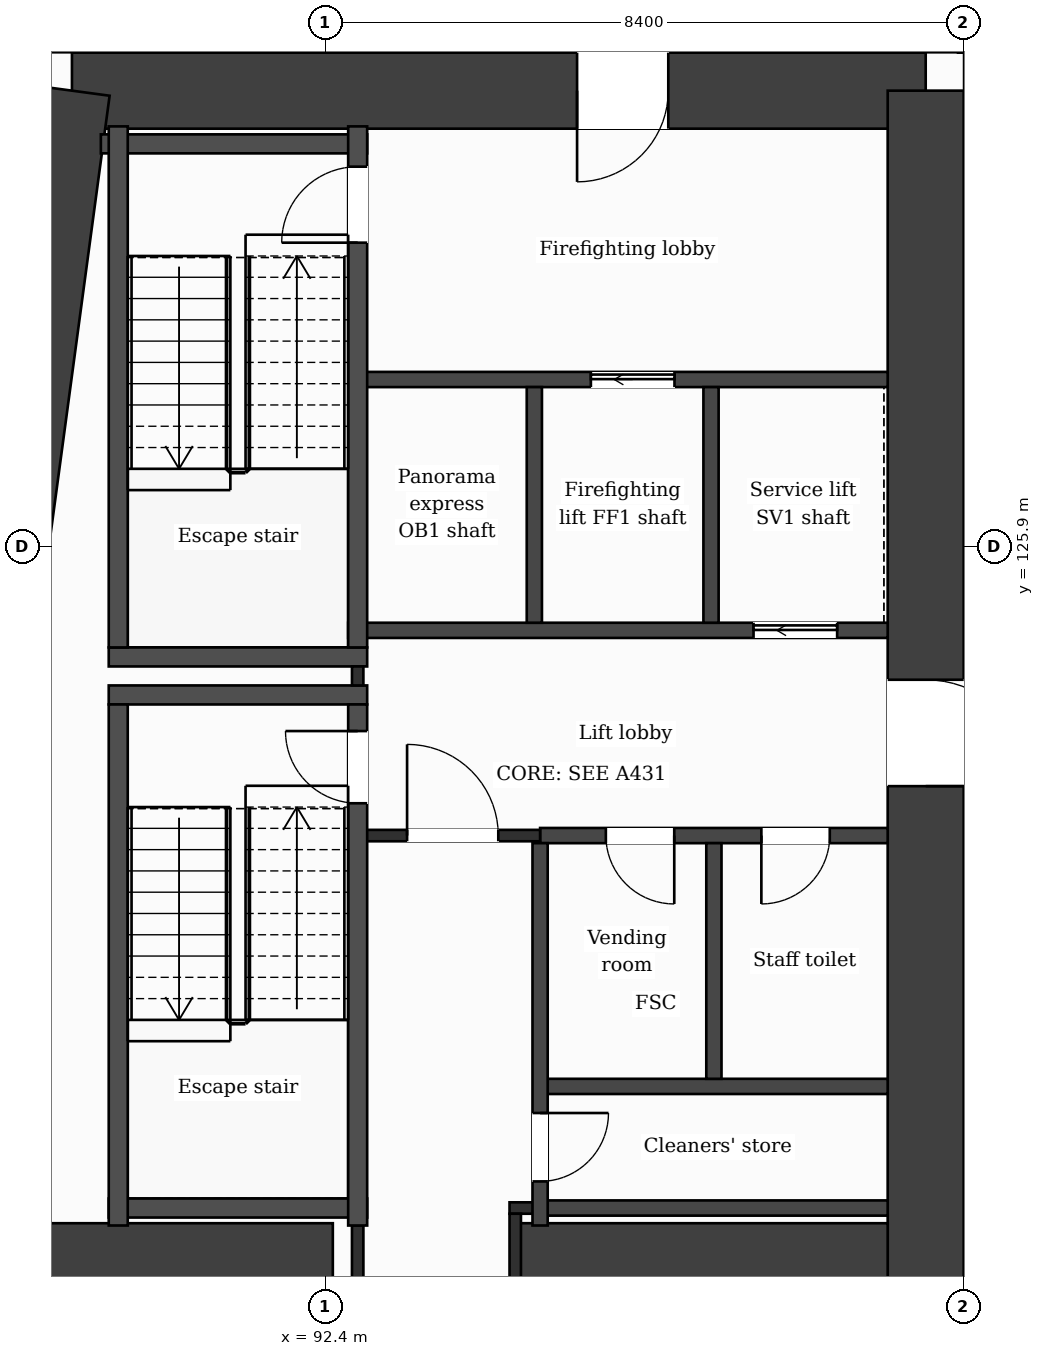
"""IFC4 building model, lengths in metres.
Left out: names, types, materials, properties, quantities, classifications, styles, units other than length and angle.
Written with IfcOpenShell. Run it as: python <this file> out.ifc"""

import sys

from ifc_helpers import new_model, si_unit, direction, frame, frame_2d, origin, place, context, subcontext, project, spatial, rectangle, extrude, element, fill, save


model = new_model("IFC4")
c1 = context("Model", 3, precision=1e-05, world=origin(), true_north=direction((0.0, 1.0)))
c2 = subcontext(c1, "Body", "Model", "MODEL_VIEW")
j1 = project(units=[si_unit("LENGTHUNIT", "METRE"), si_unit("PLANEANGLEUNIT", "RADIAN")], contexts=[c1])
p1 = place(None, origin())
s1 = spatial("IfcSite", under=j1, at=p1, CompositionType="ELEMENT")
p2 = place(p1, origin())
s2 = spatial("IfcBuilding", under=s1, at=p2, CompositionType="ELEMENT")
p3 = place(p2, frame((0.0, 0.0, 128.0)))
s3 = spatial("IfcBuildingStorey", under=s2, at=p3, CompositionType="ELEMENT", Elevation=128.0)
p4 = place(p3, frame((89.068, 131.9, 0.0), z_axis=(0.0, 0.0, 1.0), x_axis=(1.0, 0.0, 0.0)))
e1 = element("IfcWall", 1, at=p4, inside=s3, PredefinedType="SHEAR", context=c2, shape_type="SweptSolid", body=[
    extrude(rectangle(XDim=11.232, YDim=1.0, at=frame_2d((5.616, 0.0))), origin(), (0.0, 0.0, 1.0), 3.7),
])
p5 = place(p4, frame((6.646, 0.0, 0.0)))
e2 = element("IfcOpeningElement", 2, at=p5, cuts=e1, PredefinedType="OPENING", context=c2, shape_type="SweptSolid", body=[
    extrude(rectangle(XDim=1.2, YDim=2.1, at=frame_2d((0.6, 1.05))), frame((0.0, 0.51, 0.0), z_axis=(0.0, -1.0, 0.0), x_axis=(1.0, 0.0, 0.0)), (0.0, 0.0, 1.0), 1.02),
])
p6 = place(p3, frame((100.3, 131.9, 0.0), z_axis=(0.0, 0.0, 1.0), x_axis=(0.0, -1.0, 0.0)))
e3 = element("IfcWall", 3, at=p6, inside=s3, PredefinedType="SHEAR", context=c2, shape_type="SweptSolid", body=[
    extrude(rectangle(XDim=21.0, YDim=1.0, at=frame_2d((10.5, 0.0))), origin(), (0.0, 0.0, 1.0), 3.7),
])
p7 = place(p6, frame((7.75, 0.0, 0.0)))
e4 = element("IfcOpeningElement", 4, at=p7, cuts=e3, PredefinedType="OPENING", context=c2, shape_type="SweptSolid", body=[
    extrude(rectangle(XDim=1.4, YDim=2.1, at=frame_2d((0.7, 1.05))), frame((0.0, 0.51, 0.0), z_axis=(0.0, -1.0, 0.0), x_axis=(1.0, 0.0, 0.0)), (0.0, 0.0, 1.0), 1.02),
])
p8 = place(p3, frame((86.241, 110.9, 0.0), z_axis=(0.0, 0.0, 1.0), x_axis=(0.133411141623, 0.991060778808, 0.0)))
e5 = element("IfcWall", 5, at=p8, inside=s3, PredefinedType="SHEAR", context=c2, shape_type="SweptSolid", body=[
    extrude(rectangle(XDim=21.189, YDim=1.0, at=frame_2d((10.595, 0.0))), origin(), (0.0, 0.0, 1.0), 3.7),
])
p9 = place(p3, frame((87.423, 116.5, 0.0), z_axis=(0.0, 0.0, 1.0), x_axis=(1.0, 0.0, 0.0)))
e6 = element("IfcWall", 6, at=p9, inside=s3, PredefinedType="SHEAR", context=c2, shape_type="SweptSolid", body=[
    extrude(rectangle(XDim=5.077, YDim=1.0, at=frame_2d((2.539, 0.0))), origin(), (0.0, 0.0, 1.0), 3.7),
])
p10 = place(p3, frame((94.9, 116.5, 0.0), z_axis=(0.0, 0.0, 1.0), x_axis=(1.0, 0.0, 0.0)))
e7 = element("IfcWall", 7, at=p10, inside=s3, PredefinedType="SHEAR", context=c2, shape_type="SweptSolid", body=[
    extrude(rectangle(XDim=4.9, YDim=1.0, at=frame_2d((2.45, 0.0))), origin(), (0.0, 0.0, 1.0), 3.7),
])
p11 = place(p3, frame((91.177, 138.95, 0.0), z_axis=(0.0, 0.0, 1.0), x_axis=(-0.133426664613, -0.991058689065, 0.0)))
e8 = element("IfcWall", 8, at=p11, inside=s3, PredefinedType="SOLIDWALL", context=c2, shape_type="SweptSolid", body=[
    extrude(rectangle(XDim=6.609, YDim=0.3, at=frame_2d((3.305, 0.0))), origin(), (0.0, 0.0, 1.0), 3.38),
])
p12 = place(p11, frame((1.039, 0.0, 0.9)))
e9 = element("IfcOpeningElement", 9, at=p12, cuts=e8, PredefinedType="OPENING", context=c2, shape_type="SweptSolid", body=[
    extrude(rectangle(XDim=1.2, YDim=2.1, at=frame_2d((0.6, 1.05))), frame((0.0, 0.16, 0.0), z_axis=(0.0, -1.0, 0.0), x_axis=(1.0, 0.0, 0.0)), (0.0, 0.0, 1.0), 0.32),
])
p13 = place(p11, frame((4.294, 0.0, 0.0)))
e10 = element("IfcOpeningElement", 10, at=p13, cuts=e8, PredefinedType="OPENING", context=c2, shape_type="SweptSolid", body=[
    extrude(rectangle(XDim=1.2, YDim=2.4, at=frame_2d((0.6, 1.2))), frame((0.0, 0.16, 0.0), z_axis=(0.0, -1.0, 0.0), x_axis=(1.0, 0.0, 0.0)), (0.0, 0.0, 1.0), 0.32),
])
p14 = place(p3, frame((95.227, 117.2, 0.0), z_axis=(0.0, 0.0, 1.0), x_axis=(1.0, 0.0, 0.0)))
e11 = element("IfcWall", 11, at=p14, inside=s3, PredefinedType="PARTITIONING", context=c2, shape_type="SweptSolid", body=[
    extrude(rectangle(XDim=4.573, YDim=0.2, at=frame_2d((2.287, 0.0))), origin(), (0.0, 0.0, 1.0), 3.38),
])
p15 = place(p3, frame((94.825, 117.2, 0.0), z_axis=(0.0, 0.0, 1.0), x_axis=(1.0, 0.0, 0.0)))
e12 = element("IfcWall", 12, at=p15, inside=s3, PredefinedType="PARTITIONING", context=c2, shape_type="SweptSolid", body=[
    extrude(rectangle(XDim=0.402, YDim=0.15, at=frame_2d((0.201, 0.0))), origin(), (0.0, 0.0, 1.0), 3.38),
])
p16 = place(p3, frame((89.552, 117.2, 0.0), z_axis=(0.0, 0.0, 1.0), x_axis=(1.0, 0.0, 0.0)))
e13 = element("IfcWall", 13, at=p16, inside=s3, PredefinedType="PARTITIONING", context=c2, shape_type="SweptSolid", body=[
    extrude(rectangle(XDim=3.4, YDim=0.25, at=frame_2d((1.7, 0.0))), origin(), (0.0, 0.0, 1.0), 3.38),
])
p17 = place(p3, frame((95.227, 118.8, 0.0), z_axis=(0.0, 0.0, 1.0), x_axis=(1.0, 0.0, 0.0)))
e14 = element("IfcWall", 14, at=p17, inside=s3, PredefinedType="PARTITIONING", context=c2, shape_type="SweptSolid", body=[
    extrude(rectangle(XDim=4.573, YDim=0.2, at=frame_2d((2.287, 0.0))), origin(), (0.0, 0.0, 1.0), 3.38),
])
p18 = place(p3, frame((95.227, 122.1, 0.0), z_axis=(0.0, 0.0, 1.0), x_axis=(1.0, 0.0, 0.0)))
e15 = element("IfcWall", 15, at=p18, inside=s3, PredefinedType="PARTITIONING", context=c2, shape_type="SweptSolid", body=[
    extrude(rectangle(XDim=4.573, YDim=0.2, at=frame_2d((2.287, 0.0))), origin(), (0.0, 0.0, 1.0), 3.38),
])
p19 = place(p18, frame((0.865, 0.0, 0.0)))
e16 = element("IfcOpeningElement", 16, at=p19, cuts=e15, PredefinedType="OPENING", context=c2, shape_type="SweptSolid", body=[
    extrude(rectangle(XDim=0.9, YDim=2.1, at=frame_2d((0.45, 1.05))), frame((0.0, 0.11, 0.0), z_axis=(0.0, -1.0, 0.0), x_axis=(1.0, 0.0, 0.0)), (0.0, 0.0, 1.0), 0.22),
])
p20 = place(p18, frame((2.911, 0.0, 0.0)))
e17 = element("IfcOpeningElement", 17, at=p20, cuts=e15, PredefinedType="OPENING", context=c2, shape_type="SweptSolid", body=[
    extrude(rectangle(XDim=0.9, YDim=2.1, at=frame_2d((0.45, 1.05))), frame((0.0, 0.11, 0.0), z_axis=(0.0, -1.0, 0.0), x_axis=(1.0, 0.0, 0.0)), (0.0, 0.0, 1.0), 0.22),
])
p21 = place(p3, frame((92.827, 122.1, 0.0), z_axis=(0.0, 0.0, 1.0), x_axis=(1.0, 0.0, 0.0)))
e18 = element("IfcWall", 18, at=p21, inside=s3, PredefinedType="PARTITIONING", context=c2, shape_type="SweptSolid", body=[
    extrude(rectangle(XDim=2.4, YDim=0.15, at=frame_2d((1.2, 0.0))), origin(), (0.0, 0.0, 1.0), 3.38),
])
p22 = place(p21, frame((0.65, 0.0, 0.0)))
e19 = element("IfcOpeningElement", 19, at=p22, cuts=e18, PredefinedType="OPENING", context=c2, shape_type="SweptSolid", body=[
    extrude(rectangle(XDim=1.2, YDim=2.1, at=frame_2d((0.6, 1.05))), frame((0.0, 0.085, 0.0), z_axis=(0.0, -1.0, 0.0), x_axis=(1.0, 0.0, 0.0)), (0.0, 0.0, 1.0), 0.17),
])
for number, where, z_axis, x_axis in (
    (20, (89.552, 123.95, 0.0), (0.0, 0.0, 1.0), (1.0, 0.0, 0.0)),
    (21, (89.552, 124.45, 0.0), (0.0, 0.0, 1.0), (1.0, 0.0, 0.0)),
):
    element("IfcWall", number, at=place(p3, frame(where, z_axis=z_axis, x_axis=x_axis)), inside=s3, PredefinedType="PARTITIONING", context=c2, shape_type="SweptSolid", body=[
        extrude(rectangle(XDim=3.4, YDim=0.25, at=frame_2d((1.7, 0.0))), origin(), (0.0, 0.0, 1.0), 3.38),
    ])
p23 = place(p3, frame((92.702, 124.8, 0.0), z_axis=(0.0, 0.0, 1.0), x_axis=(1.0, 0.0, 0.0)))
e22 = element("IfcWall", 22, at=p23, inside=s3, PredefinedType="PARTITIONING", context=c2, shape_type="SweptSolid", body=[
    extrude(rectangle(XDim=7.098, YDim=0.2, at=frame_2d((3.549, 0.0))), origin(), (0.0, 0.0, 1.0), 3.38),
])
p24 = place(p23, frame((5.333, 0.0, 0.0)))
e23 = element("IfcOpeningElement", 23, at=p24, cuts=e22, PredefinedType="OPENING", context=c2, shape_type="SweptSolid", body=[
    extrude(rectangle(XDim=1.1, YDim=2.1, at=frame_2d((0.55, 1.05))), frame((0.0, 0.11, 0.0), z_axis=(0.0, -1.0, 0.0), x_axis=(1.0, 0.0, 0.0)), (0.0, 0.0, 1.0), 0.22),
])
p25 = place(p3, frame((92.827, 128.1, 0.0), z_axis=(0.0, 0.0, 1.0), x_axis=(1.0, 0.0, 0.0)))
e24 = element("IfcWall", 24, at=p25, inside=s3, PredefinedType="PARTITIONING", context=c2, shape_type="SweptSolid", body=[
    extrude(rectangle(XDim=6.973, YDim=0.2, at=frame_2d((3.487, 0.0))), origin(), (0.0, 0.0, 1.0), 3.38),
])
p26 = place(p25, frame((3.068, 0.0, 0.0)))
e25 = element("IfcOpeningElement", 25, at=p26, cuts=e24, PredefinedType="OPENING", context=c2, shape_type="SweptSolid", body=[
    extrude(rectangle(XDim=1.1, YDim=2.1, at=frame_2d((0.55, 1.05))), frame((0.0, 0.11, 0.0), z_axis=(0.0, -1.0, 0.0), x_axis=(1.0, 0.0, 0.0)), (0.0, 0.0, 1.0), 0.22),
])
p27 = place(p3, frame((89.448, 131.2, 0.0), z_axis=(0.0, 0.0, 1.0), x_axis=(1.0, 0.0, 0.0)))
e26 = element("IfcWall", 26, at=p27, inside=s3, PredefinedType="PARTITIONING", context=c2, shape_type="SweptSolid", body=[
    extrude(rectangle(XDim=3.504, YDim=0.25, at=frame_2d((1.752, 0.0))), origin(), (0.0, 0.0, 1.0), 3.38),
])
for number, where, z_axis, x_axis in (
    (27, (89.677, 116.97, 0.0), (0.0, 0.0, 1.0), (0.0, 1.0, 0.0)),
    (28, (89.677, 124.575, 0.0), (0.0, 0.0, 1.0), (0.0, 1.0, 0.0)),
):
    element("IfcWall", number, at=place(p3, frame(where, z_axis=z_axis, x_axis=x_axis)), inside=s3, PredefinedType="PARTITIONING", context=c2, shape_type="SweptSolid", body=[
        extrude(rectangle(XDim=6.855, YDim=0.25, at=frame_2d((3.427, 0.0))), origin(), (0.0, 0.0, 1.0), 3.38),
    ])
p28 = place(p3, frame((92.827, 116.0, 0.0), z_axis=(0.0, 0.0, 1.0), x_axis=(0.0, 1.0, 0.0)))
e29 = element("IfcWall", 29, at=p28, inside=s3, PredefinedType="PARTITIONING", context=c2, shape_type="SweptSolid", body=[
    extrude(rectangle(XDim=0.97, YDim=0.15, at=frame_2d((0.485, 0.0))), origin(), (0.0, 0.0, 1.0), 3.38),
])
p29 = place(p3, frame((92.827, 124.075, 0.0), z_axis=(0.0, 0.0, 1.0), x_axis=(0.0, 1.0, 0.0)))
e30 = element("IfcWall", 30, at=p29, inside=s3, PredefinedType="PARTITIONING", context=c2, shape_type="SweptSolid", body=[
    extrude(rectangle(XDim=0.25, YDim=0.15, at=frame_2d((0.125, 0.0))), origin(), (0.0, 0.0, 1.0), 3.38),
])
p30 = place(p3, frame((92.827, 116.97, 0.0), z_axis=(0.0, 0.0, 1.0), x_axis=(0.0, 1.0, 0.0)))
e31 = element("IfcWall", 31, at=p30, inside=s3, PredefinedType="PARTITIONING", context=c2, shape_type="SweptSolid", body=[
    extrude(rectangle(XDim=6.855, YDim=0.25, at=frame_2d((3.427, 0.0))), origin(), (0.0, 0.0, 1.0), 3.38),
])
p31 = place(p30, frame((5.555, 0.0, 0.0)))
e32 = element("IfcOpeningElement", 32, at=p31, cuts=e31, PredefinedType="OPENING", context=c2, shape_type="SweptSolid", body=[
    extrude(rectangle(XDim=0.95, YDim=2.1, at=frame_2d((0.475, 1.05))), frame((0.0, 0.135, 0.0), z_axis=(0.0, -1.0, 0.0), x_axis=(1.0, 0.0, 0.0)), (0.0, 0.0, 1.0), 0.27),
])
p32 = place(p3, frame((92.827, 124.575, 0.0), z_axis=(0.0, 0.0, 1.0), x_axis=(0.0, 1.0, 0.0)))
e33 = element("IfcWall", 33, at=p32, inside=s3, PredefinedType="PARTITIONING", context=c2, shape_type="SweptSolid", body=[
    extrude(rectangle(XDim=6.855, YDim=0.25, at=frame_2d((3.427, 0.0))), origin(), (0.0, 0.0, 1.0), 3.38),
])
p33 = place(p32, frame((5.325, 0.0, 0.0)))
e34 = element("IfcOpeningElement", 34, at=p33, cuts=e33, PredefinedType="OPENING", context=c2, shape_type="SweptSolid", body=[
    extrude(rectangle(XDim=1.0, YDim=2.1, at=frame_2d((0.5, 1.05))), frame((0.0, 0.135, 0.0), z_axis=(0.0, -1.0, 0.0), x_axis=(1.0, 0.0, 0.0)), (0.0, 0.0, 1.0), 0.27),
])
p34 = place(p3, frame((94.9, 116.0, 0.0), z_axis=(0.0, 0.0, 1.0), x_axis=(0.0, 1.0, 0.0)))
e35 = element("IfcWall", 35, at=p34, inside=s3, PredefinedType="PARTITIONING", context=c2, shape_type="SweptSolid", body=[
    extrude(rectangle(XDim=1.125, YDim=0.15, at=frame_2d((0.562, 0.0))), origin(), (0.0, 0.0, 1.0), 3.38),
])
p35 = place(p3, frame((95.151, 124.9, 0.0), z_axis=(0.0, 0.0, 1.0), x_axis=(0.0, 1.0, 0.0)))
e36 = element("IfcWall", 36, at=p35, inside=s3, PredefinedType="PARTITIONING", context=c2, shape_type="SweptSolid", body=[
    extrude(rectangle(XDim=3.1, YDim=0.2, at=frame_2d((1.55, 0.0))), origin(), (0.0, 0.0, 1.0), 3.38),
])
p36 = place(p3, frame((95.227, 116.97, 0.0), z_axis=(0.0, 0.0, 1.0), x_axis=(0.0, 1.0, 0.0)))
e37 = element("IfcWall", 37, at=p36, inside=s3, PredefinedType="PARTITIONING", context=c2, shape_type="SweptSolid", body=[
    extrude(rectangle(XDim=5.03, YDim=0.2, at=frame_2d((2.515, 0.0))), origin(), (0.0, 0.0, 1.0), 3.38),
])
p37 = place(p36, frame((0.58, 0.0, 0.0)))
e38 = element("IfcOpeningElement", 38, at=p37, cuts=e37, PredefinedType="OPENING", context=c2, shape_type="SweptSolid", body=[
    extrude(rectangle(XDim=0.9, YDim=2.1, at=frame_2d((0.45, 1.05))), frame((0.0, 0.11, 0.0), z_axis=(0.0, -1.0, 0.0), x_axis=(1.0, 0.0, 0.0)), (0.0, 0.0, 1.0), 0.22),
])
for number, where, z_axis, x_axis in (
    (39, (97.476, 124.9, 0.0), (0.0, 0.0, 1.0), (0.0, 1.0, 0.0)),
    (40, (97.513, 118.9, 0.0), (0.0, 0.0, 1.0), (0.0, 1.0, 0.0)),
):
    element("IfcWall", number, at=place(p3, frame(where, z_axis=z_axis, x_axis=x_axis)), inside=s3, PredefinedType="PARTITIONING", context=c2, shape_type="SweptSolid", body=[
        extrude(rectangle(XDim=3.1, YDim=0.2, at=frame_2d((1.55, 0.0))), origin(), (0.0, 0.0, 1.0), 3.38),
    ])
p38 = place(p22, origin())
e41 = element("IfcDoor", 41, at=p38, inside=s3, OperationType="SINGLE_SWING_LEFT", PredefinedType="DOOR", context=c2, shape_type="SweptSolid", body=[
    extrude(rectangle(XDim=1.2, YDim=2.1, at=frame_2d((0.6, 1.05))), frame((0.0, 0.025, 0.0), z_axis=(0.0, -1.0, 0.0), x_axis=(1.0, 0.0, 0.0)), (0.0, 0.0, 1.0), 0.05),
])
fill(e19, e41)
p39 = place(p26, origin())
e42 = element("IfcDoor", 42, at=p39, inside=s3, OperationType="SLIDING_TO_LEFT", PredefinedType="DOOR", context=c2, shape_type="SweptSolid", body=[
    extrude(rectangle(XDim=1.1, YDim=2.1, at=frame_2d((0.55, 1.05))), frame((0.0, 0.025, 0.0), z_axis=(0.0, -1.0, 0.0), x_axis=(1.0, 0.0, 0.0)), (0.0, 0.0, 1.0), 0.05),
])
fill(e25, e42)
p40 = place(p24, origin())
e43 = element("IfcDoor", 43, at=p40, inside=s3, OperationType="SLIDING_TO_LEFT", PredefinedType="DOOR", context=c2, shape_type="SweptSolid", body=[
    extrude(rectangle(XDim=1.1, YDim=2.1, at=frame_2d((0.55, 1.05))), frame((0.0, 0.025, 0.0), z_axis=(0.0, -1.0, 0.0), x_axis=(1.0, 0.0, 0.0)), (0.0, 0.0, 1.0), 0.05),
])
fill(e23, e43)
p41 = place(p19, origin())
e44 = element("IfcDoor", 44, at=p41, inside=s3, OperationType="SINGLE_SWING_RIGHT", PredefinedType="DOOR", context=c2, shape_type="SweptSolid", body=[
    extrude(rectangle(XDim=0.9, YDim=2.1, at=frame_2d((0.45, 1.05))), frame((0.0, 0.025, 0.0), z_axis=(0.0, -1.0, 0.0), x_axis=(1.0, 0.0, 0.0)), (0.0, 0.0, 1.0), 0.05),
])
fill(e16, e44)
p42 = place(p20, origin())
e45 = element("IfcDoor", 45, at=p42, inside=s3, OperationType="SINGLE_SWING_LEFT", PredefinedType="DOOR", context=c2, shape_type="SweptSolid", body=[
    extrude(rectangle(XDim=0.9, YDim=2.1, at=frame_2d((0.45, 1.05))), frame((0.0, 0.025, 0.0), z_axis=(0.0, -1.0, 0.0), x_axis=(1.0, 0.0, 0.0)), (0.0, 0.0, 1.0), 0.05),
])
fill(e17, e45)
p43 = place(p31, origin())
e46 = element("IfcDoor", 46, at=p43, inside=s3, OperationType="SINGLE_SWING_RIGHT", PredefinedType="DOOR", context=c2, shape_type="SweptSolid", body=[
    extrude(rectangle(XDim=0.95, YDim=2.1, at=frame_2d((0.475, 1.05))), frame((0.0, 0.025, 0.0), z_axis=(0.0, -1.0, 0.0), x_axis=(1.0, 0.0, 0.0)), (0.0, 0.0, 1.0), 0.05),
])
fill(e32, e46)
p44 = place(p33, origin())
e47 = element("IfcDoor", 47, at=p44, inside=s3, OperationType="SINGLE_SWING_LEFT", PredefinedType="DOOR", context=c2, shape_type="SweptSolid", body=[
    extrude(rectangle(XDim=1.0, YDim=2.1, at=frame_2d((0.5, 1.05))), frame((0.0, 0.025, 0.0), z_axis=(0.0, -1.0, 0.0), x_axis=(1.0, 0.0, 0.0)), (0.0, 0.0, 1.0), 0.05),
])
fill(e34, e47)
p45 = place(p37, origin())
e48 = element("IfcDoor", 48, at=p45, inside=s3, OperationType="SINGLE_SWING_RIGHT", PredefinedType="DOOR", context=c2, shape_type="SweptSolid", body=[
    extrude(rectangle(XDim=0.9, YDim=2.1, at=frame_2d((0.45, 1.05))), frame((0.0, 0.025, 0.0), z_axis=(0.0, -1.0, 0.0), x_axis=(1.0, 0.0, 0.0)), (0.0, 0.0, 1.0), 0.05),
])
fill(e38, e48)
p46 = place(p5, origin())
e49 = element("IfcDoor", 49, at=p46, inside=s3, OperationType="SINGLE_SWING_LEFT", PredefinedType="DOOR", context=c2, shape_type="SweptSolid", body=[
    extrude(rectangle(XDim=1.2, YDim=2.1, at=frame_2d((0.6, 1.05))), frame((0.0, 0.025, 0.0), z_axis=(0.0, -1.0, 0.0), x_axis=(1.0, 0.0, 0.0)), (0.0, 0.0, 1.0), 0.05),
])
fill(e2, e49)
p47 = place(p7, origin())
e50 = element("IfcDoor", 50, at=p47, inside=s3, OperationType="SINGLE_SWING_RIGHT", PredefinedType="DOOR", context=c2, shape_type="SweptSolid", body=[
    extrude(rectangle(XDim=1.4, YDim=2.1, at=frame_2d((0.7, 1.05))), frame((0.0, 0.025, 0.0), z_axis=(0.0, -1.0, 0.0), x_axis=(1.0, 0.0, 0.0)), (0.0, 0.0, 1.0), 0.05),
])
fill(e4, e50)
save(model, sys.argv[1])
